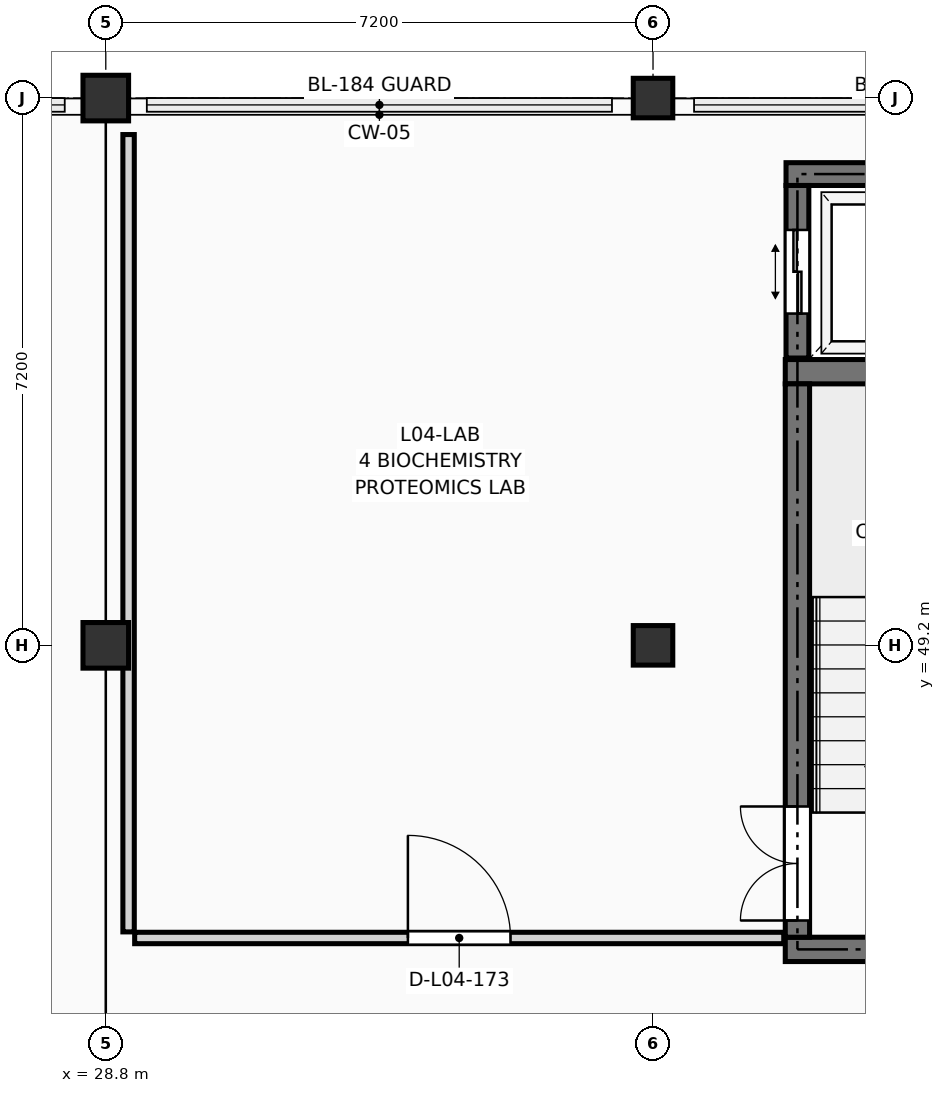
"""IFC4 building model, lengths in metres.
Left out: names, types, materials, properties, quantities, classifications, styles, units other than length and angle.
Written with IfcOpenShell. Run it as: python <this file> out.ifc"""

import sys

from ifc_helpers import new_model, si_unit, direction, frame, frame_2d, origin, origin_2d, place, context, subcontext, project, spatial, rectangle, extrude, element, fill, save


model = new_model("IFC4")
c1 = context("Model", 3, precision=1e-05, world=origin(), true_north=direction((0.0, 1.0)))
c2 = subcontext(c1, "Body", "Model", "MODEL_VIEW")
j1 = project(units=[si_unit("LENGTHUNIT", "METRE"), si_unit("PLANEANGLEUNIT", "RADIAN")], contexts=[c1])
p1 = place(None, origin())
s1 = spatial("IfcSite", under=j1, at=p1, CompositionType="ELEMENT")
p2 = place(p1, origin())
s2 = spatial("IfcBuilding", under=s1, at=p2, CompositionType="ELEMENT")
p3 = place(p2, frame((0.0, 0.0, 15.75)))
s3 = spatial("IfcBuildingStorey", under=s2, at=p3, CompositionType="ELEMENT", Elevation=15.75)
for number, where, z_axis, x_axis in (
    (1, (28.8, 49.2, 0.0), (0.0, 0.0, 1.0), (1.0, 0.0, 0.0)),
    (2, (28.8, 56.4, 0.0), (0.0, 0.0, 1.0), (1.0, 0.0, 0.0)),
):
    element("IfcColumn", number, at=place(p3, frame(where, z_axis=z_axis, x_axis=x_axis)), inside=s3, PredefinedType="COLUMN", context=c2, shape_type="SweptSolid", body=[
        extrude(rectangle(XDim=0.6, YDim=0.6, at=origin_2d()), origin(), (0.0, 0.0, 1.0), 3.6),
    ])
for number, where, z_axis, x_axis in (
    (3, (36.0, 49.2, 0.0), (0.0, 0.0, 1.0), (1.0, 0.0, 0.0)),
    (4, (36.0, 56.4, 0.0), (0.0, 0.0, 1.0), (1.0, 0.0, 0.0)),
):
    element("IfcColumn", number, at=place(p3, frame(where, z_axis=z_axis, x_axis=x_axis)), inside=s3, PredefinedType="COLUMN", context=c2, shape_type="SweptSolid", body=[
        extrude(rectangle(XDim=0.52, YDim=0.52, at=origin_2d()), origin(), (0.0, 0.0, 1.0), 3.6),
    ])
for number, where, z_axis, x_axis in (
    (5, (37.74, 45.2, 0.0), (0.0, 0.0, 1.0), (1.0, 0.0, 0.0)),
    (6, (37.74, 52.8, 0.0), (0.0, 0.0, 1.0), (1.0, 0.0, 0.0)),
):
    element("IfcWall", number, at=place(p3, frame(where, z_axis=z_axis, x_axis=x_axis)), inside=s3, PredefinedType="SHEAR", context=c2, shape_type="SweptSolid", body=[
        extrude(rectangle(XDim=4.44, YDim=0.32, at=frame_2d((2.22, 0.0))), origin(), (0.0, 0.0, 1.0), 3.39),
    ])
p4 = place(p3, frame((37.9, 45.36, 0.0), z_axis=(0.0, 0.0, 1.0), x_axis=(0.0, 1.0, 0.0)))
e7 = element("IfcWall", 7, at=p4, inside=s3, PredefinedType="SHEAR", context=c2, shape_type="SweptSolid", body=[
    extrude(rectangle(XDim=7.28, YDim=0.32, at=frame_2d((3.64, 0.0))), origin(), (0.0, 0.0, 1.0), 3.39),
])
p5 = place(p4, frame((0.22, 0.0, 0.0)))
e8 = element("IfcOpeningElement", 8, at=p5, cuts=e7, PredefinedType="OPENING", context=c2, shape_type="SweptSolid", body=[
    extrude(rectangle(XDim=1.5, YDim=2.2, at=frame_2d((0.75, 1.1))), frame((0.0, 0.172, 0.0), z_axis=(0.0, -1.0, 0.0), x_axis=(1.0, 0.0, 0.0)), (0.0, 0.0, 1.0), 0.344),
])
p6 = place(p3, frame((37.75, 55.4, 0.0), z_axis=(0.0, 0.0, 1.0), x_axis=(1.0, 0.0, 0.0)))
e9 = element("IfcWall", 9, at=p6, inside=s3, PredefinedType="SHEAR", context=c2, shape_type="SweptSolid", body=[
    extrude(rectangle(XDim=2.7, YDim=0.3, at=frame_2d((1.35, 0.0))), origin(), (0.0, 0.0, 1.0), 3.39),
])
p7 = place(p3, frame((37.9, 52.98, 0.0), z_axis=(0.0, 0.0, 1.0), x_axis=(0.0, 1.0, 0.0)))
e10 = element("IfcWall", 10, at=p7, inside=s3, PredefinedType="SHEAR", context=c2, shape_type="SweptSolid", body=[
    extrude(rectangle(XDim=2.27, YDim=0.3, at=frame_2d((1.135, 0.0))), origin(), (0.0, 0.0, 1.0), 3.39),
])
p8 = place(p7, frame((0.585, 0.0, 0.0)))
e11 = element("IfcOpeningElement", 11, at=p8, cuts=e10, PredefinedType="OPENING", context=c2, shape_type="SweptSolid", body=[
    extrude(rectangle(XDim=1.1, YDim=2.2, at=frame_2d((0.55, 1.1))), frame((0.0, 0.162, 0.0), z_axis=(0.0, -1.0, 0.0), x_axis=(1.0, 0.0, 0.0)), (0.0, 0.0, 1.0), 0.324),
])
p9 = place(p3, frame((29.1, 45.43, 0.0), z_axis=(0.0, 0.0, 1.0), x_axis=(0.0, 1.0, 0.0)))
e12 = element("IfcWall", 12, at=p9, inside=s3, PredefinedType="PARTITIONING", context=c2, shape_type="SweptSolid", body=[
    extrude(rectangle(XDim=10.49, YDim=0.15, at=frame_2d((5.245, 0.0))), origin(), (0.0, 0.0, 1.0), 2.655),
])
p10 = place(p3, frame((29.18, 45.35, 0.0), z_axis=(0.0, 0.0, 1.0), x_axis=(1.0, 0.0, 0.0)))
e13 = element("IfcWall", 13, at=p10, inside=s3, PredefinedType="PARTITIONING", context=c2, shape_type="SweptSolid", body=[
    extrude(rectangle(XDim=8.54, YDim=0.15, at=frame_2d((4.27, 0.0))), origin(), (0.0, 0.0, 1.0), 3.375),
])
p11 = place(p10, frame((3.595, 0.0, 0.0)))
e14 = element("IfcOpeningElement", 14, at=p11, cuts=e13, PredefinedType="OPENING", context=c2, shape_type="SweptSolid", body=[
    extrude(rectangle(XDim=1.35, YDim=2.2, at=frame_2d((0.675, 1.1))), frame((0.0, 0.087, 0.0), z_axis=(0.0, -1.0, 0.0), x_axis=(1.0, 0.0, 0.0)), (0.0, 0.0, 1.0), 0.174),
])
p12 = place(p5, origin())
e15 = element("IfcDoor", 15, at=p12, inside=s3, OperationType="DOUBLE_DOOR_SINGLE_SWING", PredefinedType="DOOR", context=c2, shape_type="SweptSolid", body=[
    extrude(rectangle(XDim=1.5, YDim=2.2, at=frame_2d((0.75, 1.1))), frame((0.0, 0.025, 0.0), z_axis=(0.0, -1.0, 0.0), x_axis=(1.0, 0.0, 0.0)), (0.0, 0.0, 1.0), 0.05),
])
fill(e8, e15)
p13 = place(p8, origin())
e16 = element("IfcDoor", 16, at=p13, inside=s3, OperationType="DOUBLE_DOOR_SLIDING", PredefinedType="DOOR", context=c2, shape_type="SweptSolid", body=[
    extrude(rectangle(XDim=1.1, YDim=2.2, at=frame_2d((0.55, 1.1))), frame((0.0, 0.025, 0.0), z_axis=(0.0, -1.0, 0.0), x_axis=(1.0, 0.0, 0.0)), (0.0, 0.0, 1.0), 0.05),
])
fill(e11, e16)
p14 = place(p11, origin())
e17 = element("IfcDoor", 17, at=p14, inside=s3, OperationType="SINGLE_SWING_LEFT", PredefinedType="DOOR", context=c2, shape_type="SweptSolid", body=[
    extrude(rectangle(XDim=1.35, YDim=2.2, at=frame_2d((0.675, 1.1))), frame((0.0, 0.025, 0.0), z_axis=(0.0, -1.0, 0.0), x_axis=(1.0, 0.0, 0.0)), (0.0, 0.0, 1.0), 0.05),
])
fill(e14, e17)
save(model, sys.argv[1])
